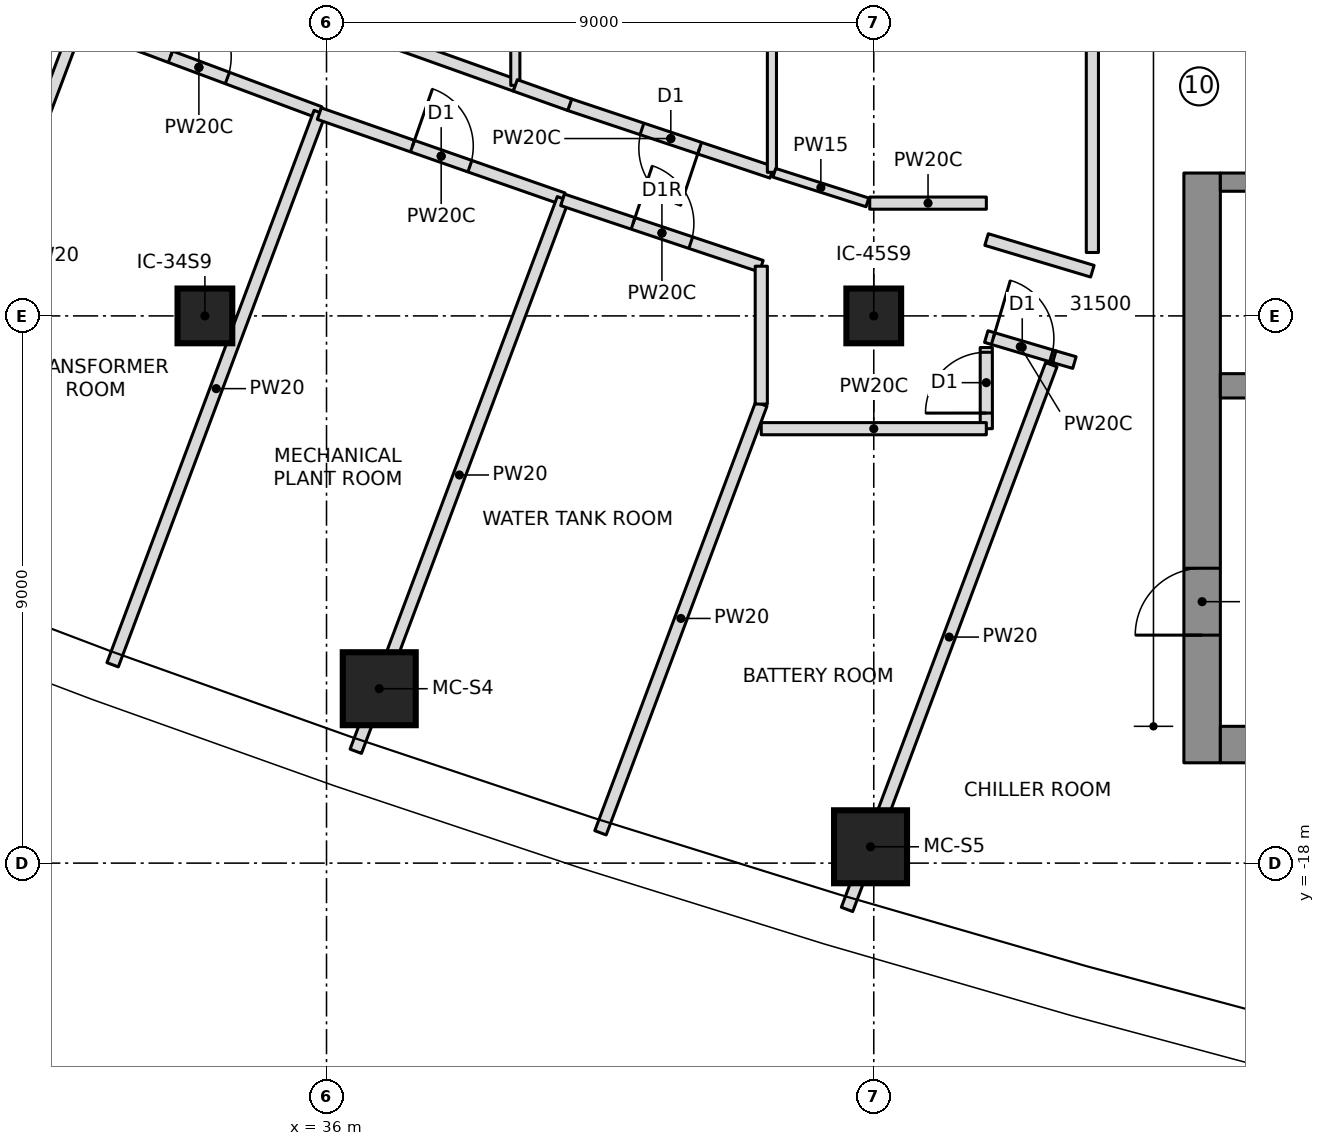
"""IFC4 building model, lengths in metres.
Left out: names, types, materials, properties, quantities, classifications, styles, units other than length and angle.
Written with IfcOpenShell. Run it as: python <this file> out.ifc"""

import sys

from ifc_helpers import new_model, si_unit, direction, frame, frame_2d, origin, origin_2d, place, context, subcontext, project, spatial, rectangle, extrude, element, fill, save


model = new_model("IFC4")
c1 = context("Model", 3, precision=1e-05, world=origin(), true_north=direction((0.0, 1.0)))
c2 = subcontext(c1, "Body", "Model", "MODEL_VIEW")
j1 = project(units=[si_unit("LENGTHUNIT", "METRE"), si_unit("PLANEANGLEUNIT", "RADIAN")], contexts=[c1])
p1 = place(None, origin())
s1 = spatial("IfcSite", under=j1, at=p1, CompositionType="ELEMENT")
p2 = place(p1, origin())
s2 = spatial("IfcBuilding", under=s1, at=p2, CompositionType="ELEMENT")
p3 = place(p2, frame((0.0, 0.0, 256.3)))
s3 = spatial("IfcBuildingStorey", under=s2, at=p3, CompositionType="ELEMENT", Elevation=256.3)
p4 = place(p3, frame((50.4, -16.35, 0.0), z_axis=(0.0, 0.0, 1.0), x_axis=(0.0, 1.0, 0.0)))
e1 = element("IfcWall", 1, at=p4, inside=s3, PredefinedType="SHEAR", context=c2, shape_type="SweptSolid", body=[
    extrude(rectangle(XDim=9.7, YDim=0.6, at=frame_2d((4.85, 0.0))), origin(), (0.0, 0.0, 1.0), 7.0),
])
p5 = place(p4, frame((2.1, 0.0, 0.0)))
e2 = element("IfcOpeningElement", 2, at=p5, cuts=e1, PredefinedType="OPENING", context=c2, shape_type="SweptSolid", body=[
    extrude(rectangle(XDim=1.1, YDim=2.1, at=frame_2d((0.55, 1.05))), frame((0.0, 0.31, 0.0), z_axis=(0.0, -1.0, 0.0), x_axis=(1.0, 0.0, 0.0)), (0.0, 0.0, 1.0), 0.62),
])
p6 = place(p3, frame((50.7, -16.05, 0.0), z_axis=(0.0, 0.0, 1.0), x_axis=(1.0, 0.0, 0.0)))
e3 = element("IfcWall", 3, at=p6, inside=s3, PredefinedType="SHEAR", context=c2, shape_type="SweptSolid", body=[
    extrude(rectangle(XDim=13.62, YDim=0.6, at=frame_2d((6.81, 0.0))), origin(), (0.0, 0.0, 1.0), 7.0),
])
p7 = place(p3, frame((50.7, -10.15, 0.0), z_axis=(0.0, 0.0, 1.0), x_axis=(1.0, 0.0, 0.0)))
e4 = element("IfcWall", 4, at=p7, inside=s3, PredefinedType="SHEAR", context=c2, shape_type="SweptSolid", body=[
    extrude(rectangle(XDim=13.02, YDim=0.4, at=frame_2d((6.51, 0.0))), origin(), (0.0, 0.0, 1.0), 7.0),
])
p8 = place(p3, frame((50.7, -6.8, 0.0), z_axis=(0.0, 0.0, 1.0), x_axis=(1.0, 0.0, 0.0)))
e5 = element("IfcWall", 5, at=p8, inside=s3, PredefinedType="SHEAR", context=c2, shape_type="SweptSolid", body=[
    extrude(rectangle(XDim=10.9, YDim=0.3, at=frame_2d((5.45, 0.0))), origin(), (0.0, 0.0, 1.0), 7.0),
])
p9 = place(p8, frame((6.3, 0.0, 0.0)))
e6 = element("IfcOpeningElement", 6, at=p9, cuts=e5, PredefinedType="OPENING", context=c2, shape_type="SweptSolid", body=[
    extrude(rectangle(XDim=1.1, YDim=2.1, at=frame_2d((0.55, 1.05))), frame((0.0, 0.16, 0.0), z_axis=(0.0, -1.0, 0.0), x_axis=(1.0, 0.0, 0.0)), (0.0, 0.0, 1.0), 0.32),
])
p10 = place(p8, frame((9.1, 0.0, 0.0)))
e7 = element("IfcOpeningElement", 7, at=p10, cuts=e5, PredefinedType="OPENING", context=c2, shape_type="SweptSolid", body=[
    extrude(rectangle(XDim=1.1, YDim=2.1, at=frame_2d((0.55, 1.05))), frame((0.0, 0.16, 0.0), z_axis=(0.0, -1.0, 0.0), x_axis=(1.0, 0.0, 0.0)), (0.0, 0.0, 1.0), 0.32),
])
p11 = place(p8, frame((0.8, 0.0, 0.0)))
e8 = element("IfcOpeningElement", 8, at=p11, cuts=e5, PredefinedType="OPENING", context=c2, shape_type="SweptSolid", body=[
    extrude(rectangle(XDim=0.9, YDim=2.1, at=frame_2d((0.45, 1.05))), frame((0.0, 0.16, 0.0), z_axis=(0.0, -1.0, 0.0), x_axis=(1.0, 0.0, 0.0)), (0.0, 0.0, 1.0), 0.32),
])
p12 = place(p8, frame((3.6, 0.0, 0.0)))
e9 = element("IfcOpeningElement", 9, at=p12, cuts=e5, PredefinedType="OPENING", context=c2, shape_type="SweptSolid", body=[
    extrude(rectangle(XDim=0.9, YDim=2.1, at=frame_2d((0.45, 1.05))), frame((0.0, 0.16, 0.0), z_axis=(0.0, -1.0, 0.0), x_axis=(1.0, 0.0, 0.0)), (0.0, 0.0, 1.0), 0.32),
])
for number, where, z_axis, x_axis in (
    (10, (36.867, -15.132, 0.0), (0.0, 0.0, 1.0), (1.0, 0.0, 0.0)),
    (11, (44.947, -17.731, 0.0), (0.0, 0.0, 1.0), (1.0, 0.0, 0.0)),
):
    element("IfcColumn", number, at=place(p3, frame(where, z_axis=z_axis, x_axis=x_axis)), inside=s3, PredefinedType="COLUMN", context=c2, shape_type="SweptSolid", body=[
        extrude(rectangle(XDim=1.2, YDim=1.2, at=origin_2d()), origin(), (0.0, 0.0, 1.0), 5.2),
    ])
for number, where, z_axis, x_axis in (
    (12, (34.0, -9.0, 0.0), (0.0, 0.0, 1.0), (1.0, 0.0, 0.0)),
    (13, (45.0, -9.0, 0.0), (0.0, 0.0, 1.0), (1.0, 0.0, 0.0)),
):
    element("IfcColumn", number, at=place(p3, frame(where, z_axis=z_axis, x_axis=x_axis)), inside=s3, PredefinedType="COLUMN", context=c2, shape_type="SweptSolid", body=[
        extrude(rectangle(XDim=0.9, YDim=0.9, at=origin_2d()), origin(), (0.0, 0.0, 1.0), 7.0),
    ])
p13 = place(p3, frame((29.026, -11.869, 0.0), z_axis=(0.0, 0.0, 1.0), x_axis=(0.351120195515, 0.93633039484, 0.0)))
e14 = element("IfcWall", 14, at=p13, inside=s3, PredefinedType="PARTITIONING", context=c2, shape_type="SweptSolid", body=[
    extrude(rectangle(XDim=8.242, YDim=0.2, at=frame_2d((4.121, 0.0))), origin(), (0.0, 0.0, 1.0), 6.7),
])
p14 = place(p3, frame((31.913, -4.17, 0.0), z_axis=(0.0, 0.0, 1.0), x_axis=(0.936848300955, -0.349735987565, 0.0)))
e15 = element("IfcWall", 15, at=p14, inside=s3, PredefinedType="PARTITIONING", context=c2, shape_type="SweptSolid", body=[
    extrude(rectangle(XDim=4.244, YDim=0.2, at=frame_2d((2.122, 0.0))), origin(), (0.0, 0.0, 1.0), 6.7),
])
p15 = place(p14, frame((1.622, 0.0, 0.0)))
e16 = element("IfcOpeningElement", 16, at=p15, cuts=e15, PredefinedType="OPENING", context=c2, shape_type="SweptSolid", body=[
    extrude(rectangle(XDim=1.0, YDim=2.1, at=frame_2d((0.5, 1.05))), frame((0.0, 0.11, 0.0), z_axis=(0.0, -1.0, 0.0), x_axis=(1.0, 0.0, 0.0)), (0.0, 0.0, 1.0), 0.22),
])
p16 = place(p3, frame((32.483, -14.738, 0.0), z_axis=(0.0, 0.0, 1.0), x_axis=(0.351117925717, 0.936331246002, 0.0)))
e17 = element("IfcWall", 17, at=p16, inside=s3, PredefinedType="PARTITIONING", context=c2, shape_type="SweptSolid", body=[
    extrude(rectangle(XDim=9.701, YDim=0.2, at=frame_2d((4.851, 0.0))), origin(), (0.0, 0.0, 1.0), 6.7),
])
p17 = place(p3, frame((35.882, -5.673, 0.0), z_axis=(0.0, 0.0, 1.0), x_axis=(0.944107376821, -0.329638075823, 0.0)))
e18 = element("IfcWall", 18, at=p17, inside=s3, PredefinedType="PARTITIONING", context=c2, shape_type="SweptSolid", body=[
    extrude(rectangle(XDim=4.245, YDim=0.2, at=frame_2d((2.122, 0.0))), origin(), (0.0, 0.0, 1.0), 6.7),
])
p18 = place(p17, frame((1.622, 0.0, 0.0)))
e19 = element("IfcOpeningElement", 19, at=p18, cuts=e18, PredefinedType="OPENING", context=c2, shape_type="SweptSolid", body=[
    extrude(rectangle(XDim=1.0, YDim=2.1, at=frame_2d((0.5, 1.05))), frame((0.0, 0.11, 0.0), z_axis=(0.0, -1.0, 0.0), x_axis=(1.0, 0.0, 0.0)), (0.0, 0.0, 1.0), 0.22),
])
p19 = place(p3, frame((36.481, -16.161, 0.0), z_axis=(0.0, 0.0, 1.0), x_axis=(0.35112895446, 0.936327110224, 0.0)))
e20 = element("IfcWall", 20, at=p19, inside=s3, PredefinedType="PARTITIONING", context=c2, shape_type="SweptSolid", body=[
    extrude(rectangle(XDim=9.706, YDim=0.2, at=frame_2d((4.853, 0.0))), origin(), (0.0, 0.0, 1.0), 6.7),
])
p20 = place(p3, frame((39.882, -7.091, 0.0), z_axis=(0.0, 0.0, 1.0), x_axis=(0.948477584784, -0.316844238013, 0.0)))
e21 = element("IfcWall", 21, at=p20, inside=s3, PredefinedType="PARTITIONING", context=c2, shape_type="SweptSolid", body=[
    extrude(rectangle(XDim=3.445, YDim=0.2, at=frame_2d((1.723, 0.0))), origin(), (0.0, 0.0, 1.0), 6.7),
])
p21 = place(p20, frame((1.222, 0.0, 0.0)))
e22 = element("IfcOpeningElement", 22, at=p21, cuts=e21, PredefinedType="OPENING", context=c2, shape_type="SweptSolid", body=[
    extrude(rectangle(XDim=1.0, YDim=2.1, at=frame_2d((0.5, 1.05))), frame((0.0, 0.11, 0.0), z_axis=(0.0, -1.0, 0.0), x_axis=(1.0, 0.0, 0.0)), (0.0, 0.0, 1.0), 0.22),
])
p22 = place(p3, frame((40.506, -17.501, 0.0), z_axis=(0.0, 0.0, 1.0), x_axis=(0.351119888923, 0.936330509811, 0.0)))
e23 = element("IfcWall", 23, at=p22, inside=s3, PredefinedType="PARTITIONING", context=c2, shape_type="SweptSolid", body=[
    extrude(rectangle(XDim=7.531, YDim=0.2, at=frame_2d((3.766, 0.0))), origin(), (0.0, 0.0, 1.0), 6.7),
])
p23 = place(p3, frame((46.85, -9.34, 0.0), z_axis=(0.0, 0.0, 1.0), x_axis=(0.958867721668, -0.283853293696, 0.0)))
e24 = element("IfcWall", 24, at=p23, inside=s3, PredefinedType="PARTITIONING", context=c2, shape_type="SweptSolid", body=[
    extrude(rectangle(XDim=1.167, YDim=0.2, at=frame_2d((0.583, 0.0))), origin(), (0.0, 0.0, 1.0), 6.7),
])
p24 = place(p23, frame((0.117, 0.0, 0.0)))
e25 = element("IfcOpeningElement", 25, at=p24, cuts=e24, PredefinedType="OPENING", context=c2, shape_type="SweptSolid", body=[
    extrude(rectangle(XDim=1.0, YDim=2.1, at=frame_2d((0.5, 1.05))), frame((0.0, 0.11, 0.0), z_axis=(0.0, -1.0, 0.0), x_axis=(1.0, 0.0, 0.0)), (0.0, 0.0, 1.0), 0.22),
])
p25 = place(p3, frame((44.56, -18.762, 0.0), z_axis=(0.0, 0.0, 1.0), x_axis=(0.351123441588, 0.936329177569, 0.0)))
e26 = element("IfcWall", 26, at=p25, inside=s3, PredefinedType="PARTITIONING", context=c2, shape_type="SweptSolid", body=[
    extrude(rectangle(XDim=9.568, YDim=0.2, at=frame_2d((4.784, 0.0))), origin(), (0.0, 0.0, 1.0), 6.7),
])
p26 = place(p3, frame((39.105, -5.208, 0.0), z_axis=(0.0, 0.0, 1.0), x_axis=(-0.941905026751, 0.335879324433, 0.0)))
e27 = element("IfcWall", 27, at=p26, inside=s3, PredefinedType="PARTITIONING", context=c2, shape_type="SweptSolid", body=[
    extrude(rectangle(XDim=3.046, YDim=0.2, at=frame_2d((1.523, 0.0))), origin(), (0.0, 0.0, 1.0), 6.7),
])
p27 = place(p3, frame((39.105, -5.208, 0.0), z_axis=(0.0, 0.0, 1.0), x_axis=(0.0, 1.0, 0.0)))
e28 = element("IfcWall", 28, at=p27, inside=s3, PredefinedType="PARTITIONING", context=c2, shape_type="SweptSolid", body=[
    extrude(rectangle(XDim=10.417, YDim=0.15, at=frame_2d((5.208, 0.0))), origin(), (0.0, 0.0, 1.0), 6.7),
])
p28 = place(p3, frame((43.325, -6.638, 0.0), z_axis=(0.0, 0.0, 1.0), x_axis=(-0.948467231483, 0.316875229077, 0.0)))
e29 = element("IfcWall", 29, at=p28, inside=s3, PredefinedType="PARTITIONING", context=c2, shape_type="SweptSolid", body=[
    extrude(rectangle(XDim=3.506, YDim=0.2, at=frame_2d((1.753, 0.0))), origin(), (0.0, 0.0, 1.0), 6.7),
])
p29 = place(p28, frame((1.253, 0.0, 0.0)))
e30 = element("IfcOpeningElement", 30, at=p29, cuts=e29, PredefinedType="OPENING", context=c2, shape_type="SweptSolid", body=[
    extrude(rectangle(XDim=1.0, YDim=2.1, at=frame_2d((0.5, 1.05))), frame((0.0, 0.11, 0.0), z_axis=(0.0, -1.0, 0.0), x_axis=(1.0, 0.0, 0.0)), (0.0, 0.0, 1.0), 0.22),
])
p30 = place(p3, frame((39.999, -5.527, 0.0), z_axis=(0.0, 0.0, 1.0), x_axis=(-0.941922126768, 0.335831367065, 0.0)))
e31 = element("IfcWall", 31, at=p30, inside=s3, PredefinedType="PARTITIONING", context=c2, shape_type="SweptSolid", body=[
    extrude(rectangle(XDim=0.949, YDim=0.2, at=frame_2d((0.475, 0.0))), origin(), (0.0, 0.0, 1.0), 6.7),
])
p31 = place(p3, frame((43.325, -6.638, 0.0), z_axis=(0.0, 0.0, 1.0), x_axis=(0.0, 1.0, 0.0)))
e32 = element("IfcWall", 32, at=p31, inside=s3, PredefinedType="PARTITIONING", context=c2, shape_type="SweptSolid", body=[
    extrude(rectangle(XDim=13.277, YDim=0.15, at=frame_2d((6.638, 0.0))), origin(), (0.0, 0.0, 1.0), 6.7),
])
p32 = place(p3, frame((47.969, -9.671, 0.0), z_axis=(0.0, 0.0, 1.0), x_axis=(0.96060909839, -0.277903148759, 0.0)))
e33 = element("IfcWall", 33, at=p32, inside=s3, PredefinedType="PARTITIONING", context=c2, shape_type="SweptSolid", body=[
    extrude(rectangle(XDim=0.344, YDim=0.2, at=frame_2d((0.172, 0.0))), origin(), (0.0, 0.0, 1.0), 6.7),
])
p33 = place(p3, frame((48.595, 7.33, 0.0), z_axis=(0.0, 0.0, 1.0), x_axis=(0.0, -1.0, 0.0)))
e34 = element("IfcWall", 34, at=p33, inside=s3, PredefinedType="PARTITIONING", context=c2, shape_type="SweptSolid", body=[
    extrude(rectangle(XDim=15.287, YDim=0.2, at=frame_2d((7.643, 0.0))), origin(), (0.0, 0.0, 1.0), 6.7),
])
p34 = place(p33, frame((7.297, 0.0, 0.0)))
e35 = element("IfcOpeningElement", 35, at=p34, cuts=e34, PredefinedType="OPENING", context=c2, shape_type="SweptSolid", body=[
    extrude(rectangle(XDim=1.0, YDim=2.1, at=frame_2d((0.5, 1.05))), frame((0.0, 0.11, 0.0), z_axis=(0.0, -1.0, 0.0), x_axis=(1.0, 0.0, 0.0)), (0.0, 0.0, 1.0), 0.22),
])
p35 = place(p3, frame((48.595, -8.265, 0.0), z_axis=(0.0, 0.0, 1.0), x_axis=(-0.958014760688, 0.286718883759, 0.0)))
e36 = element("IfcWall", 36, at=p35, inside=s3, PredefinedType="PARTITIONING", context=c2, shape_type="SweptSolid", body=[
    extrude(rectangle(XDim=1.816, YDim=0.2, at=frame_2d((0.908, 0.0))), origin(), (0.0, 0.0, 1.0), 6.7),
])
p36 = place(p3, frame((46.852, -7.145, 0.0), z_axis=(0.0, 0.0, 1.0), x_axis=(-0.999999991898, 0.000127291241, 0.0)))
e37 = element("IfcWall", 37, at=p36, inside=s3, PredefinedType="PARTITIONING", context=c2, shape_type="SweptSolid", body=[
    extrude(rectangle(XDim=1.918, YDim=0.2, at=frame_2d((0.959, 0.0))), origin(), (0.0, 0.0, 1.0), 6.7),
])
p37 = place(p3, frame((44.896, -7.133, 0.0), z_axis=(0.0, 0.0, 1.0), x_axis=(-0.952953711994, 0.303115857052, 0.0)))
e38 = element("IfcWall", 38, at=p37, inside=s3, PredefinedType="PARTITIONING", context=c2, shape_type="SweptSolid", body=[
    extrude(rectangle(XDim=1.607, YDim=0.15, at=frame_2d((0.803, 0.0))), origin(), (0.0, 0.0, 1.0), 6.7),
])
p38 = place(p3, frame((43.15, -8.183, 0.0), z_axis=(0.0, 0.0, 1.0), x_axis=(0.0, -1.0, 0.0)))
e39 = element("IfcWall", 39, at=p38, inside=s3, PredefinedType="PARTITIONING", context=c2, shape_type="SweptSolid", body=[
    extrude(rectangle(XDim=2.267, YDim=0.2, at=frame_2d((1.134, 0.0))), origin(), (0.0, 0.0, 1.0), 6.7),
])
p39 = place(p3, frame((46.851, -10.855, 0.0), z_axis=(0.0, 0.0, 1.0), x_axis=(-0.0007315287, 0.999999732433, 0.0)))
e40 = element("IfcWall", 40, at=p39, inside=s3, PredefinedType="PARTITIONING", context=c2, shape_type="SweptSolid", body=[
    extrude(rectangle(XDim=1.335, YDim=0.2, at=frame_2d((0.667, 0.0))), origin(), (0.0, 0.0, 1.0), 6.7),
])
p40 = place(p39, frame((0.257, 0.0, 0.0)))
e41 = element("IfcOpeningElement", 41, at=p40, cuts=e40, PredefinedType="OPENING", context=c2, shape_type="SweptSolid", body=[
    extrude(rectangle(XDim=1.0, YDim=2.1, at=frame_2d((0.5, 1.05))), frame((0.0, 0.11, 0.0), z_axis=(0.0, -1.0, 0.0), x_axis=(1.0, 0.0, 0.0)), (0.0, 0.0, 1.0), 0.22),
])
p41 = place(p3, frame((43.149, -10.855, 0.0), z_axis=(0.0, 0.0, 1.0), x_axis=(1.0, 0.0, 0.0)))
e42 = element("IfcWall", 42, at=p41, inside=s3, PredefinedType="PARTITIONING", context=c2, shape_type="SweptSolid", body=[
    extrude(rectangle(XDim=3.702, YDim=0.2, at=frame_2d((1.851, 0.0))), origin(), (0.0, 0.0, 1.0), 6.7),
])
p42 = place(p15, origin())
e43 = element("IfcDoor", 43, at=p42, inside=s3, OperationType="SINGLE_SWING_RIGHT", PredefinedType="DOOR", context=c2, shape_type="SweptSolid", body=[
    extrude(rectangle(XDim=1.0, YDim=2.1, at=frame_2d((0.5, 1.05))), frame((0.0, 0.025, 0.0), z_axis=(0.0, -1.0, 0.0), x_axis=(1.0, 0.0, 0.0)), (0.0, 0.0, 1.0), 0.05),
])
fill(e16, e43)
p43 = place(p18, origin())
e44 = element("IfcDoor", 44, at=p43, inside=s3, OperationType="SINGLE_SWING_LEFT", PredefinedType="DOOR", context=c2, shape_type="SweptSolid", body=[
    extrude(rectangle(XDim=1.0, YDim=2.1, at=frame_2d((0.5, 1.05))), frame((0.0, 0.025, 0.0), z_axis=(0.0, -1.0, 0.0), x_axis=(1.0, 0.0, 0.0)), (0.0, 0.0, 1.0), 0.05),
])
fill(e19, e44)
p44 = place(p21, origin())
e45 = element("IfcDoor", 45, at=p44, inside=s3, OperationType="SINGLE_SWING_RIGHT", PredefinedType="DOOR", context=c2, shape_type="SweptSolid", body=[
    extrude(rectangle(XDim=1.0, YDim=2.1, at=frame_2d((0.5, 1.05))), frame((0.0, 0.025, 0.0), z_axis=(0.0, -1.0, 0.0), x_axis=(1.0, 0.0, 0.0)), (0.0, 0.0, 1.0), 0.05),
])
fill(e22, e45)
p45 = place(p24, origin())
e46 = element("IfcDoor", 46, at=p45, inside=s3, OperationType="SINGLE_SWING_LEFT", PredefinedType="DOOR", context=c2, shape_type="SweptSolid", body=[
    extrude(rectangle(XDim=1.0, YDim=2.1, at=frame_2d((0.5, 1.05))), frame((0.0, 0.025, 0.0), z_axis=(0.0, -1.0, 0.0), x_axis=(1.0, 0.0, 0.0)), (0.0, 0.0, 1.0), 0.05),
])
fill(e25, e46)
p46 = place(p29, origin())
e47 = element("IfcDoor", 47, at=p46, inside=s3, OperationType="SINGLE_SWING_LEFT", PredefinedType="DOOR", context=c2, shape_type="SweptSolid", body=[
    extrude(rectangle(XDim=1.0, YDim=2.1, at=frame_2d((0.5, 1.05))), frame((0.0, 0.025, 0.0), z_axis=(0.0, -1.0, 0.0), x_axis=(1.0, 0.0, 0.0)), (0.0, 0.0, 1.0), 0.05),
])
fill(e30, e47)
p47 = place(p40, origin())
e48 = element("IfcDoor", 48, at=p47, inside=s3, OperationType="SINGLE_SWING_LEFT", PredefinedType="DOOR", context=c2, shape_type="SweptSolid", body=[
    extrude(rectangle(XDim=1.0, YDim=2.1, at=frame_2d((0.5, 1.05))), frame((0.0, 0.025, 0.0), z_axis=(0.0, -1.0, 0.0), x_axis=(1.0, 0.0, 0.0)), (0.0, 0.0, 1.0), 0.05),
])
fill(e41, e48)
p48 = place(p5, origin())
e49 = element("IfcDoor", 49, at=p48, inside=s3, OperationType="SINGLE_SWING_RIGHT", PredefinedType="DOOR", context=c2, shape_type="SweptSolid", body=[
    extrude(rectangle(XDim=1.1, YDim=2.1, at=frame_2d((0.55, 1.05))), frame((0.0, 0.025, 0.0), z_axis=(0.0, -1.0, 0.0), x_axis=(1.0, 0.0, 0.0)), (0.0, 0.0, 1.0), 0.05),
])
fill(e2, e49)
save(model, sys.argv[1])
